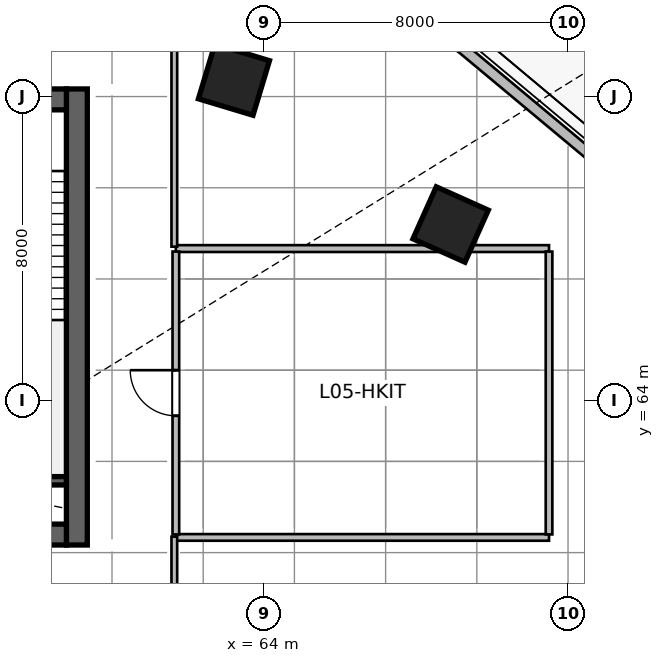
"""IFC4 building model, lengths in metres.
Left out: names, types, materials, properties, quantities, classifications, styles, units other than length and angle.
Written with IfcOpenShell. Run it as: python <this file> out.ifc"""

import sys

from ifc_helpers import new_model, si_unit, direction, frame, frame_2d, origin, origin_2d, place, context, subcontext, project, spatial, rectangle, extrude, source, transform, mapped, element, fill, save


model = new_model("IFC4")
c1 = context("Model", 3, precision=1e-05, world=origin(), true_north=direction((0.0, 1.0)))
c2 = subcontext(c1, "Body", "Model", "MODEL_VIEW")
j1 = project(units=[si_unit("LENGTHUNIT", "METRE"), si_unit("PLANEANGLEUNIT", "RADIAN")], contexts=[c1])
p1 = place(None, origin())
s1 = spatial("IfcSite", under=j1, at=p1, CompositionType="ELEMENT")
p2 = place(p1, origin())
s2 = spatial("IfcBuilding", under=s1, at=p2, CompositionType="ELEMENT")
p3 = place(p2, frame((0.0, 0.0, 30.0)))
s3 = spatial("IfcBuildingStorey", under=s2, at=p3, CompositionType="ELEMENT", Elevation=30.0)
m1 = source(origin(), c2, "Body", "SweptSolid", [
    extrude(rectangle(XDim=12.0, YDim=0.55, at=frame_2d((6.0, 0.0))), origin(), (0.0, 0.0, 1.0), 5.4),
])
p4 = place(p3, frame((59.075, 60.2, 0.0), z_axis=(0.0, 0.0, 1.0), x_axis=(0.0, 1.0, 0.0)))
e1 = element("IfcWall", 1, at=p4, inside=s3, PredefinedType="SHEAR", context=c2, shape_type="MappedRepresentation", body=[
    mapped(m1, transform((0.0, 0.0, 0.0), scale=1.0)),
])
m2 = source(origin(), c2, "Body", "SweptSolid", [
    extrude(rectangle(XDim=21.6, YDim=0.55, at=frame_2d((10.8, 0.0))), origin(), (0.0, 0.0, 1.0), 5.4),
])
p5 = place(p3, frame((37.2, 60.475, 0.0), z_axis=(0.0, 0.0, 1.0), x_axis=(1.0, 0.0, 0.0)))
e2 = element("IfcWall", 2, at=p5, inside=s3, PredefinedType="SHEAR", context=c2, shape_type="MappedRepresentation", body=[
    mapped(m2, transform((0.0, 0.0, 0.0), scale=1.0)),
])
p6 = place(p5, frame((1.1, 0.0, 0.0)))
e3 = element("IfcOpeningElement", 3, at=p6, cuts=e2, PredefinedType="OPENING", context=c2, shape_type="SweptSolid", body=[
    extrude(rectangle(XDim=1.15, YDim=2.15, at=frame_2d((0.575, 1.075))), frame((0.0, 0.285, 0.0), z_axis=(0.0, -1.0, 0.0), x_axis=(1.0, 0.0, 0.0)), (0.0, 0.0, 1.0), 0.57),
])
p7 = place(p5, frame((19.5, 0.0, 0.0)))
e4 = element("IfcOpeningElement", 4, at=p7, cuts=e2, PredefinedType="OPENING", context=c2, shape_type="SweptSolid", body=[
    extrude(rectangle(XDim=0.9, YDim=2.1, at=frame_2d((0.45, 1.05))), frame((0.0, 0.285, 0.0), z_axis=(0.0, -1.0, 0.0), x_axis=(1.0, 0.0, 0.0)), (0.0, 0.0, 1.0), 0.57),
])
p8 = place(p5, frame((12.02, 0.0, 0.0)))
e5 = element("IfcOpeningElement", 5, at=p8, cuts=e2, PredefinedType="OPENING", context=c2, shape_type="SweptSolid", body=[
    extrude(rectangle(XDim=1.6, YDim=2.15, at=frame_2d((0.8, 1.075))), frame((0.0, 0.285, 0.0), z_axis=(0.0, -1.0, 0.0), x_axis=(1.0, 0.0, 0.0)), (0.0, 0.0, 1.0), 0.57),
])
p9 = place(p3, frame((37.2, 71.925, 0.0), z_axis=(0.0, 0.0, 1.0), x_axis=(1.0, 0.0, 0.0)))
e6 = element("IfcWall", 6, at=p9, inside=s3, PredefinedType="SHEAR", context=c2, shape_type="MappedRepresentation", body=[
    mapped(m2, transform((0.0, 0.0, 0.0), scale=1.0)),
])
p10 = place(p9, frame((1.2, 0.0, 0.0)))
e7 = element("IfcOpeningElement", 7, at=p10, cuts=e6, PredefinedType="OPENING", context=c2, shape_type="SweptSolid", body=[
    extrude(rectangle(XDim=0.9, YDim=2.1, at=frame_2d((0.45, 1.05))), frame((0.0, 0.285, 0.0), z_axis=(0.0, -1.0, 0.0), x_axis=(1.0, 0.0, 0.0)), (0.0, 0.0, 1.0), 0.57),
])
p11 = place(p9, frame((14.7, 0.0, 0.0)))
e8 = element("IfcOpeningElement", 8, at=p11, cuts=e6, PredefinedType="OPENING", context=c2, shape_type="SweptSolid", body=[
    extrude(rectangle(XDim=1.2, YDim=2.15, at=frame_2d((0.6, 1.075))), frame((0.0, 0.285, 0.0), z_axis=(0.0, -1.0, 0.0), x_axis=(1.0, 0.0, 0.0)), (0.0, 0.0, 1.0), 0.57),
])
p12 = place(p9, frame((4.15, 0.0, 0.0)))
e9 = element("IfcOpeningElement", 9, at=p12, cuts=e6, PredefinedType="OPENING", context=c2, shape_type="SweptSolid", body=[
    extrude(rectangle(XDim=1.3, YDim=2.15, at=frame_2d((0.65, 1.075))), frame((0.0, 0.285, 0.0), z_axis=(0.0, -1.0, 0.0), x_axis=(1.0, 0.0, 0.0)), (0.0, 0.0, 1.0), 0.57),
])
p13 = place(p9, frame((7.25, 0.0, 0.0)))
e10 = element("IfcOpeningElement", 10, at=p13, cuts=e6, PredefinedType="OPENING", context=c2, shape_type="SweptSolid", body=[
    extrude(rectangle(XDim=0.9, YDim=2.1, at=frame_2d((0.45, 1.05))), frame((0.0, 0.285, 0.0), z_axis=(0.0, -1.0, 0.0), x_axis=(1.0, 0.0, 0.0)), (0.0, 0.0, 1.0), 0.57),
])
m3 = source(origin(), c2, "Body", "SweptSolid", [
    extrude(rectangle(XDim=3.27, YDim=0.22, at=frame_2d((1.635, 0.0))), origin(), (0.0, 0.0, 1.0), 5.4),
])
p14 = place(p3, frame((55.53, 61.89, 0.0), z_axis=(0.0, 0.0, 1.0), x_axis=(1.0, 0.0, 0.0)))
e11 = element("IfcWall", 11, at=p14, inside=s3, PredefinedType="SHEAR", context=c2, shape_type="MappedRepresentation", body=[
    mapped(m3, transform((0.0, 0.0, 0.0), scale=1.0)),
])
m4 = source(origin(), c2, "Body", "SweptSolid", [
    extrude(rectangle(XDim=1.5, YDim=1.5, at=origin_2d()), origin(), (0.0, 0.0, 1.0), 5.4),
])
for number, where, z_axis, x_axis in (
    (12, (63.209, 72.442, 0.0), (0.0, 0.0, 1.0), (0.289, 0.957, 0.0)),
    (13, (68.91, 68.633, 0.0), (0.0, 0.0, 1.0), (0.409, 0.912, 0.0)),
):
    element("IfcColumn", number, at=place(p3, frame(where, z_axis=z_axis, x_axis=x_axis)), inside=s3, PredefinedType="COLUMN", context=c2, shape_type="MappedRepresentation", body=[
        mapped(m4, transform((0.0, 0.0, 0.0), scale=1.0)),
    ])
m5 = source(origin(), c2, "Body", "SweptSolid", [
    extrude(rectangle(XDim=4.891, YDim=0.28, at=frame_2d((2.445, 0.0))), origin(), (0.0, 0.0, 1.0), 5.16),
])
p15 = place(p3, frame((69.176, 73.306, 0.0), z_axis=(0.0, 0.0, 1.0), x_axis=(0.767926604795, -0.640537844041, 0.0)))
e14 = element("IfcWall", 14, at=p15, inside=s3, PredefinedType="SOLIDWALL", context=c2, shape_type="MappedRepresentation", body=[
    mapped(m5, transform((0.0, 0.0, 0.0), scale=1.0)),
])
m6 = source(origin(), c2, "Body", "SweptSolid", [
    extrude(rectangle(XDim=9.82, YDim=0.175, at=frame_2d((4.91, 0.0))), origin(), (0.0, 0.0, 1.0), 5.16),
])
p16 = place(p3, frame((61.68, 60.4, 0.0), z_axis=(0.0, 0.0, 1.0), x_axis=(1.0, 0.0, 0.0)))
e15 = element("IfcWall", 15, at=p16, inside=s3, PredefinedType="PARTITIONING", context=c2, shape_type="MappedRepresentation", body=[
    mapped(m6, transform((0.0, 0.0, 0.0), scale=1.0)),
])
m7 = source(origin(), c2, "Body", "SweptSolid", [
    extrude(rectangle(XDim=9.82, YDim=0.18, at=frame_2d((4.91, 0.0))), origin(), (0.0, 0.0, 1.0), 5.16),
])
p17 = place(p3, frame((61.68, 68.0, 0.0), z_axis=(0.0, 0.0, 1.0), x_axis=(1.0, 0.0, 0.0)))
e16 = element("IfcWall", 16, at=p17, inside=s3, PredefinedType="PLUMBINGWALL", context=c2, shape_type="MappedRepresentation", body=[
    mapped(m7, transform((0.0, 0.0, 0.0), scale=1.0)),
])
m8 = source(origin(), c2, "Body", "SweptSolid", [
    extrude(rectangle(XDim=7.443, YDim=0.175, at=frame_2d((3.721, 0.0))), origin(), (0.0, 0.0, 1.0), 5.16),
])
p18 = place(p3, frame((61.68, 60.479, 0.0), z_axis=(0.0, 0.0, 1.0), x_axis=(0.0, 1.0, 0.0)))
e17 = element("IfcWall", 17, at=p18, inside=s3, PredefinedType="PARTITIONING", context=c2, shape_type="MappedRepresentation", body=[
    mapped(m8, transform((0.0, 0.0, 0.0), scale=1.0)),
])
p19 = place(p18, frame((3.121, 0.0, 0.0)))
e18 = element("IfcOpeningElement", 18, at=p19, cuts=e17, PredefinedType="OPENING", context=c2, shape_type="SweptSolid", body=[
    extrude(rectangle(XDim=1.2, YDim=2.15, at=frame_2d((0.6, 1.075))), frame((0.0, 0.098, 0.0), z_axis=(0.0, -1.0, 0.0), x_axis=(1.0, 0.0, 0.0)), (0.0, 0.0, 1.0), 0.195),
])
m9 = source(origin(), c2, "Body", "SweptSolid", [
    extrude(rectangle(XDim=7.443, YDim=0.175, at=frame_2d((3.721, 0.0))), origin(), (0.0, 0.0, 1.0), 4.591),
])
p20 = place(p3, frame((71.5, 60.479, 0.0), z_axis=(0.0, 0.0, 1.0), x_axis=(0.0, 1.0, 0.0)))
e19 = element("IfcWall", 19, at=p20, inside=s3, PredefinedType="PARTITIONING", context=c2, shape_type="MappedRepresentation", body=[
    mapped(m9, transform((0.0, 0.0, 0.0), scale=1.0)),
])
m10 = source(origin(), c2, "Body", "SweptSolid", [
    extrude(rectangle(XDim=2.46, YDim=0.15, at=frame_2d((1.23, 0.0))), origin(), (0.0, 0.0, 1.0), 5.16),
])
p21 = place(p3, frame((61.64, 57.96, 0.0), z_axis=(0.0, 0.0, 1.0), x_axis=(0.0, 1.0, 0.0)))
e20 = element("IfcWall", 20, at=p21, inside=s3, PredefinedType="PARTITIONING", context=c2, shape_type="MappedRepresentation", body=[
    mapped(m10, transform((0.0, 0.0, 0.0), scale=1.0)),
])
m11 = source(origin(), c2, "Body", "SweptSolid", [
    extrude(rectangle(XDim=9.618, YDim=0.15, at=frame_2d((4.809, 0.0))), origin(), (0.0, 0.0, 1.0), 5.16),
])
p22 = place(p3, frame((61.64, 68.05, 0.0), z_axis=(0.0, 0.0, 1.0), x_axis=(0.0, 1.0, 0.0)))
e21 = element("IfcWall", 21, at=p22, inside=s3, PredefinedType="PARTITIONING", context=c2, shape_type="MappedRepresentation", body=[
    mapped(m11, transform((0.0, 0.0, 0.0), scale=1.0)),
])
m12 = source(origin(), c2, "Body", "SweptSolid", [
    extrude(rectangle(XDim=1.2, YDim=2.15, at=frame_2d((0.6, 1.075))), frame((0.0, 0.025, 0.0), z_axis=(0.0, -1.0, 0.0), x_axis=(1.0, 0.0, 0.0)), (0.0, 0.0, 1.0), 0.05),
])
p23 = place(p19, origin())
e22 = element("IfcDoor", 22, at=p23, inside=s3, OperationType="SINGLE_SWING_RIGHT", PredefinedType="DOOR", context=c2, shape_type="MappedRepresentation", body=[
    mapped(m12, transform((0.0, 0.0, 0.0), scale=1.0)),
])
fill(e18, e22)
save(model, sys.argv[1])
